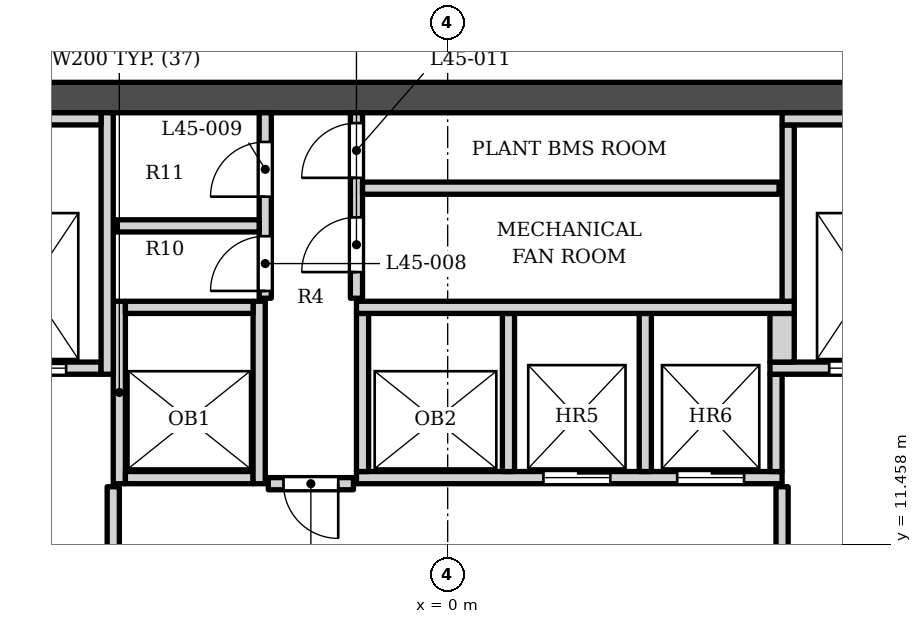
"""IFC4 building model, lengths in metres.
Left out: names, types, materials, properties, quantities, classifications, styles, units other than length and angle.
Written with IfcOpenShell. Run it as: python <this file> out.ifc"""

import sys

from ifc_helpers import new_model, si_unit, direction, frame, frame_2d, origin, place, context, subcontext, project, spatial, rectangle, extrude, element, fill, save


model = new_model("IFC4")
c1 = context("Model", 3, precision=1e-05, world=origin(), true_north=direction((0.0, 1.0)))
c2 = subcontext(c1, "Body", "Model", "MODEL_VIEW")
j1 = project(units=[si_unit("LENGTHUNIT", "METRE"), si_unit("PLANEANGLEUNIT", "RADIAN")], contexts=[c1])
p1 = place(None, origin())
s1 = spatial("IfcSite", under=j1, at=p1, CompositionType="ELEMENT")
p2 = place(p1, origin())
s2 = spatial("IfcBuilding", under=s1, at=p2, CompositionType="ELEMENT")
p3 = place(p2, frame((0.0, 0.0, 191.4)))
s3 = spatial("IfcBuildingStorey", under=s2, at=p3, CompositionType="ELEMENT", Elevation=191.4)
p4 = place(p3, frame((-15.1, 18.802, 0.0), z_axis=(0.0, 0.0, 1.0), x_axis=(1.0, 0.0, 0.0)))
e1 = element("IfcWall", 1, at=p4, inside=s3, PredefinedType="SHEAR", context=c2, shape_type="SweptSolid", body=[
    extrude(rectangle(XDim=30.2, YDim=0.5, at=frame_2d((15.1, 0.0))), origin(), (0.0, 0.0, 1.0), 5.0),
])
p5 = place(p3, frame((-5.5, 9.103, 0.0), z_axis=(0.0, 0.0, 1.0), x_axis=(0.0, 1.0, 0.0)))
e2 = element("IfcWall", 2, at=p5, inside=s3, PredefinedType="SOLIDWALL", context=c2, shape_type="SweptSolid", body=[
    extrude(rectangle(XDim=3.3, YDim=0.2, at=frame_2d((1.65, 0.0))), origin(), (0.0, 0.0, 1.0), 4.83),
])
p6 = place(p5, frame((0.85, 0.0, 0.0)))
e3 = element("IfcOpeningElement", 3, at=p6, cuts=e2, PredefinedType="OPENING", context=c2, shape_type="SweptSolid", body=[
    extrude(rectangle(XDim=1.4, YDim=2.1, at=frame_2d((0.7, 1.05))), frame((0.0, 0.11, 0.0), z_axis=(0.0, -1.0, 0.0), x_axis=(1.0, 0.0, 0.0)), (0.0, 0.0, 1.0), 0.22),
])
p7 = place(p3, frame((5.5, 9.103, 0.0), z_axis=(0.0, 0.0, 1.0), x_axis=(0.0, 1.0, 0.0)))
e4 = element("IfcWall", 4, at=p7, inside=s3, PredefinedType="SOLIDWALL", context=c2, shape_type="SweptSolid", body=[
    extrude(rectangle(XDim=3.3, YDim=0.2, at=frame_2d((1.65, 0.0))), origin(), (0.0, 0.0, 1.0), 4.83),
])
p8 = place(p7, frame((0.85, 0.0, 0.0)))
e5 = element("IfcOpeningElement", 5, at=p8, cuts=e4, PredefinedType="OPENING", context=c2, shape_type="SweptSolid", body=[
    extrude(rectangle(XDim=1.4, YDim=2.1, at=frame_2d((0.7, 1.05))), frame((0.0, 0.11, 0.0), z_axis=(0.0, -1.0, 0.0), x_axis=(1.0, 0.0, 0.0)), (0.0, 0.0, 1.0), 0.22),
])
p9 = place(p3, frame((-2.95, 12.453, 0.0), z_axis=(0.0, 0.0, 1.0), x_axis=(1.0, 0.0, 0.0)))
e6 = element("IfcWall", 6, at=p9, inside=s3, PredefinedType="SOLIDWALL", context=c2, shape_type="SweptSolid", body=[
    extrude(rectangle(XDim=1.4, YDim=0.2, at=frame_2d((0.7, 0.0))), origin(), (0.0, 0.0, 1.0), 4.83),
])
p10 = place(p9, frame((0.25, 0.0, 0.0)))
e7 = element("IfcOpeningElement", 7, at=p10, cuts=e6, PredefinedType="OPENING", context=c2, shape_type="SweptSolid", body=[
    extrude(rectangle(XDim=0.9, YDim=2.1, at=frame_2d((0.45, 1.05))), frame((0.0, 0.11, 0.0), z_axis=(0.0, -1.0, 0.0), x_axis=(1.0, 0.0, 0.0)), (0.0, 0.0, 1.0), 0.22),
])
p11 = place(p3, frame((-5.4, 12.453, 0.0), z_axis=(0.0, 0.0, 1.0), x_axis=(0.0, 1.0, 0.0)))
e8 = element("IfcWall", 8, at=p11, inside=s3, PredefinedType="SOLIDWALL", context=c2, shape_type="SweptSolid", body=[
    extrude(rectangle(XDim=3.0, YDim=0.2, at=frame_2d((1.5, 0.0))), origin(), (0.0, 0.0, 1.0), 4.83),
])
p12 = place(p3, frame((-5.3, 12.552, 0.0), z_axis=(0.0, 0.0, 1.0), x_axis=(1.0, 0.0, 0.0)))
e9 = element("IfcWall", 9, at=p12, inside=s3, PredefinedType="SOLIDWALL", context=c2, shape_type="SweptSolid", body=[
    extrude(rectangle(XDim=2.1, YDim=0.2, at=frame_2d((1.05, 0.0))), origin(), (0.0, 0.0, 1.0), 4.83),
])
p13 = place(p3, frame((-3.1, 12.453, 0.0), z_axis=(0.0, 0.0, 1.0), x_axis=(0.0, 1.0, 0.0)))
e10 = element("IfcWall", 10, at=p13, inside=s3, PredefinedType="SOLIDWALL", context=c2, shape_type="SweptSolid", body=[
    extrude(rectangle(XDim=3.0, YDim=0.2, at=frame_2d((1.5, 0.0))), origin(), (0.0, 0.0, 1.0), 4.83),
])
p14 = place(p3, frame((-1.5, 12.552, 0.0), z_axis=(0.0, 0.0, 1.0), x_axis=(1.0, 0.0, 0.0)))
e11 = element("IfcWall", 11, at=p14, inside=s3, PredefinedType="SOLIDWALL", context=c2, shape_type="SweptSolid", body=[
    extrude(rectangle(XDim=7.0, YDim=0.2, at=frame_2d((3.5, 0.0))), origin(), (0.0, 0.0, 1.0), 4.83),
])
p15 = place(p14, frame((3.075, 0.0, 0.0)))
e12 = element("IfcOpeningElement", 12, at=p15, cuts=e11, PredefinedType="OPENING", context=c2, shape_type="SweptSolid", body=[
    extrude(rectangle(XDim=1.1, YDim=2.1, at=frame_2d((0.55, 1.05))), frame((0.0, 0.11, 0.0), z_axis=(0.0, -1.0, 0.0), x_axis=(1.0, 0.0, 0.0)), (0.0, 0.0, 1.0), 0.22),
])
p16 = place(p14, frame((5.275, 0.0, 0.0)))
e13 = element("IfcOpeningElement", 13, at=p16, cuts=e11, PredefinedType="OPENING", context=c2, shape_type="SweptSolid", body=[
    extrude(rectangle(XDim=1.1, YDim=2.1, at=frame_2d((0.55, 1.05))), frame((0.0, 0.11, 0.0), z_axis=(0.0, -1.0, 0.0), x_axis=(1.0, 0.0, 0.0)), (0.0, 0.0, 1.0), 0.22),
])
for number, where, z_axis, x_axis in (
    (14, (-1.4, 12.653, 0.0), (0.0, 0.0, 1.0), (0.0, 1.0, 0.0)),
    (15, (1.0, 12.653, 0.0), (0.0, 0.0, 1.0), (0.0, 1.0, 0.0)),
    (16, (3.25, 12.653, 0.0), (0.0, 0.0, 1.0), (0.0, 1.0, 0.0)),
):
    element("IfcWall", number, at=place(p3, frame(where, z_axis=z_axis, x_axis=x_axis)), inside=s3, PredefinedType="SOLIDWALL", context=c2, shape_type="SweptSolid", body=[
        extrude(rectangle(XDim=2.6, YDim=0.2, at=frame_2d((1.3, 0.0))), origin(), (0.0, 0.0, 1.0), 4.83),
    ])
p17 = place(p3, frame((5.4, 12.653, 0.0), z_axis=(0.0, 0.0, 1.0), x_axis=(0.0, 1.0, 0.0)))
e17 = element("IfcWall", 17, at=p17, inside=s3, PredefinedType="SOLIDWALL", context=c2, shape_type="SweptSolid", body=[
    extrude(rectangle(XDim=1.6, YDim=0.2, at=frame_2d((0.8, 0.0))), origin(), (0.0, 0.0, 1.0), 4.83),
])
p18 = place(p3, frame((-8.05, 14.353, 0.0), z_axis=(0.0, 0.0, 1.0), x_axis=(1.0, 0.0, 0.0)))
e18 = element("IfcWall", 18, at=p18, inside=s3, PredefinedType="SOLIDWALL", context=c2, shape_type="SweptSolid", body=[
    extrude(rectangle(XDim=2.35, YDim=0.2, at=frame_2d((1.175, 0.0))), origin(), (0.0, 0.0, 1.0), 4.83),
])
p19 = place(p18, frame((0.575, 0.0, 0.0)))
e19 = element("IfcOpeningElement", 19, at=p19, cuts=e18, PredefinedType="OPENING", context=c2, shape_type="SweptSolid", body=[
    extrude(rectangle(XDim=1.2, YDim=2.1, at=frame_2d((0.6, 1.05))), frame((0.0, 0.11, 0.0), z_axis=(0.0, -1.0, 0.0), x_axis=(1.0, 0.0, 0.0)), (0.0, 0.0, 1.0), 0.22),
])
p20 = place(p3, frame((-5.6, 14.253, 0.0), z_axis=(0.0, 0.0, 1.0), x_axis=(0.0, 1.0, 0.0)))
e20 = element("IfcWall", 20, at=p20, inside=s3, PredefinedType="SOLIDWALL", context=c2, shape_type="SweptSolid", body=[
    extrude(rectangle(XDim=4.3, YDim=0.2, at=frame_2d((2.15, 0.0))), origin(), (0.0, 0.0, 1.0), 4.83),
])
p21 = place(p3, frame((5.3, 14.353, 0.0), z_axis=(0.0, 0.0, 1.0), x_axis=(1.0, 0.0, 0.0)))
e21 = element("IfcWall", 21, at=p21, inside=s3, PredefinedType="SOLIDWALL", context=c2, shape_type="SweptSolid", body=[
    extrude(rectangle(XDim=2.75, YDim=0.2, at=frame_2d((1.375, 0.0))), origin(), (0.0, 0.0, 1.0), 4.83),
])
p22 = place(p21, frame((0.975, 0.0, 0.0)))
e22 = element("IfcOpeningElement", 22, at=p22, cuts=e21, PredefinedType="OPENING", context=c2, shape_type="SweptSolid", body=[
    extrude(rectangle(XDim=1.2, YDim=2.1, at=frame_2d((0.6, 1.05))), frame((0.0, 0.11, 0.0), z_axis=(0.0, -1.0, 0.0), x_axis=(1.0, 0.0, 0.0)), (0.0, 0.0, 1.0), 0.22),
])
p23 = place(p3, frame((5.5, 14.453, 0.0), z_axis=(0.0, 0.0, 1.0), x_axis=(0.0, 1.0, 0.0)))
e23 = element("IfcWall", 23, at=p23, inside=s3, PredefinedType="SOLIDWALL", context=c2, shape_type="SweptSolid", body=[
    extrude(rectangle(XDim=0.8, YDim=0.4, at=frame_2d((0.4, 0.0))), origin(), (0.0, 0.0, 1.0), 4.83),
])
p24 = place(p3, frame((-5.3, 15.353, 0.0), z_axis=(0.0, 0.0, 1.0), x_axis=(1.0, 0.0, 0.0)))
e24 = element("IfcWall", 24, at=p24, inside=s3, PredefinedType="SOLIDWALL", context=c2, shape_type="SweptSolid", body=[
    extrude(rectangle(XDim=2.1, YDim=0.2, at=frame_2d((1.05, 0.0))), origin(), (0.0, 0.0, 1.0), 4.83),
])
p25 = place(p3, frame((-1.5, 15.353, 0.0), z_axis=(0.0, 0.0, 1.0), x_axis=(1.0, 0.0, 0.0)))
e25 = element("IfcWall", 25, at=p25, inside=s3, PredefinedType="SOLIDWALL", context=c2, shape_type="SweptSolid", body=[
    extrude(rectangle(XDim=7.2, YDim=0.2, at=frame_2d((3.6, 0.0))), origin(), (0.0, 0.0, 1.0), 4.83),
])
p26 = place(p3, frame((5.6, 15.453, 0.0), z_axis=(0.0, 0.0, 1.0), x_axis=(0.0, 1.0, 0.0)))
e26 = element("IfcWall", 26, at=p26, inside=s3, PredefinedType="SOLIDWALL", context=c2, shape_type="SweptSolid", body=[
    extrude(rectangle(XDim=2.9, YDim=0.2, at=frame_2d((1.45, 0.0))), origin(), (0.0, 0.0, 1.0), 4.83),
])
p27 = place(p3, frame((-3.0, 15.503, 0.0), z_axis=(0.0, 0.0, 1.0), x_axis=(0.0, 1.0, 0.0)))
e27 = element("IfcWall", 27, at=p27, inside=s3, PredefinedType="SOLIDWALL", context=c2, shape_type="SweptSolid", body=[
    extrude(rectangle(XDim=3.05, YDim=0.2, at=frame_2d((1.525, 0.0))), origin(), (0.0, 0.0, 1.0), 4.83),
])
p28 = place(p27, frame((0.12, 0.0, 0.0)))
e28 = element("IfcOpeningElement", 28, at=p28, cuts=e27, PredefinedType="OPENING", context=c2, shape_type="SweptSolid", body=[
    extrude(rectangle(XDim=0.9, YDim=2.1, at=frame_2d((0.45, 1.05))), frame((0.0, 0.11, 0.0), z_axis=(0.0, -1.0, 0.0), x_axis=(1.0, 0.0, 0.0)), (0.0, 0.0, 1.0), 0.22),
])
p29 = place(p27, frame((1.67, 0.0, 0.0)))
e29 = element("IfcOpeningElement", 29, at=p29, cuts=e27, PredefinedType="OPENING", context=c2, shape_type="SweptSolid", body=[
    extrude(rectangle(XDim=0.9, YDim=2.1, at=frame_2d((0.45, 1.05))), frame((0.0, 0.11, 0.0), z_axis=(0.0, -1.0, 0.0), x_axis=(1.0, 0.0, 0.0)), (0.0, 0.0, 1.0), 0.22),
])
p30 = place(p3, frame((-1.5, 15.503, 0.0), z_axis=(0.0, 0.0, 1.0), x_axis=(0.0, 1.0, 0.0)))
e30 = element("IfcWall", 30, at=p30, inside=s3, PredefinedType="SOLIDWALL", context=c2, shape_type="SweptSolid", body=[
    extrude(rectangle(XDim=3.05, YDim=0.2, at=frame_2d((1.525, 0.0))), origin(), (0.0, 0.0, 1.0), 4.83),
])
p31 = place(p30, frame((0.43, 0.0, 0.0)))
e31 = element("IfcOpeningElement", 31, at=p31, cuts=e30, PredefinedType="OPENING", context=c2, shape_type="SweptSolid", body=[
    extrude(rectangle(XDim=0.9, YDim=2.1, at=frame_2d((0.45, 1.05))), frame((0.0, 0.11, 0.0), z_axis=(0.0, -1.0, 0.0), x_axis=(1.0, 0.0, 0.0)), (0.0, 0.0, 1.0), 0.22),
])
p32 = place(p30, frame((1.98, 0.0, 0.0)))
e32 = element("IfcOpeningElement", 32, at=p32, cuts=e30, PredefinedType="OPENING", context=c2, shape_type="SweptSolid", body=[
    extrude(rectangle(XDim=0.9, YDim=2.1, at=frame_2d((0.45, 1.05))), frame((0.0, 0.11, 0.0), z_axis=(0.0, -1.0, 0.0), x_axis=(1.0, 0.0, 0.0)), (0.0, 0.0, 1.0), 0.22),
])
p33 = place(p3, frame((-5.45, 16.693, 0.0), z_axis=(0.0, 0.0, 1.0), x_axis=(1.0, 0.0, 0.0)))
e33 = element("IfcWall", 33, at=p33, inside=s3, PredefinedType="SOLIDWALL", context=c2, shape_type="SweptSolid", body=[
    extrude(rectangle(XDim=2.35, YDim=0.2, at=frame_2d((1.175, 0.0))), origin(), (0.0, 0.0, 1.0), 4.83),
])
p34 = place(p3, frame((-1.4, 17.312, 0.0), z_axis=(0.0, 0.0, 1.0), x_axis=(1.0, 0.0, 0.0)))
e34 = element("IfcWall", 34, at=p34, inside=s3, PredefinedType="SOLIDWALL", context=c2, shape_type="SweptSolid", body=[
    extrude(rectangle(XDim=6.85, YDim=0.2, at=frame_2d((3.425, 0.0))), origin(), (0.0, 0.0, 1.0), 4.83),
])
p35 = place(p3, frame((-8.05, 18.453, 0.0), z_axis=(0.0, 0.0, 1.0), x_axis=(1.0, 0.0, 0.0)))
e35 = element("IfcWall", 35, at=p35, inside=s3, PredefinedType="SOLIDWALL", context=c2, shape_type="SweptSolid", body=[
    extrude(rectangle(XDim=2.35, YDim=0.2, at=frame_2d((1.175, 0.0))), origin(), (0.0, 0.0, 1.0), 4.83),
])
p36 = place(p3, frame((5.5, 18.453, 0.0), z_axis=(0.0, 0.0, 1.0), x_axis=(1.0, 0.0, 0.0)))
e36 = element("IfcWall", 36, at=p36, inside=s3, PredefinedType="SOLIDWALL", context=c2, shape_type="SweptSolid", body=[
    extrude(rectangle(XDim=2.55, YDim=0.2, at=frame_2d((1.275, 0.0))), origin(), (0.0, 0.0, 1.0), 4.83),
])
p37 = place(p15, origin())
e37 = element("IfcDoor", 37, at=p37, inside=s3, OperationType="DOUBLE_DOOR_SLIDING", PredefinedType="DOOR", context=c2, shape_type="SweptSolid", body=[
    extrude(rectangle(XDim=1.1, YDim=2.1, at=frame_2d((0.55, 1.05))), frame((0.0, 0.025, 0.0), z_axis=(0.0, -1.0, 0.0), x_axis=(1.0, 0.0, 0.0)), (0.0, 0.0, 1.0), 0.05),
])
fill(e12, e37)
p38 = place(p16, origin())
e38 = element("IfcDoor", 38, at=p38, inside=s3, OperationType="DOUBLE_DOOR_SLIDING", PredefinedType="DOOR", context=c2, shape_type="SweptSolid", body=[
    extrude(rectangle(XDim=1.1, YDim=2.1, at=frame_2d((0.55, 1.05))), frame((0.0, 0.025, 0.0), z_axis=(0.0, -1.0, 0.0), x_axis=(1.0, 0.0, 0.0)), (0.0, 0.0, 1.0), 0.05),
])
fill(e13, e38)
p39 = place(p19, origin())
e39 = element("IfcDoor", 39, at=p39, inside=s3, OperationType="DOUBLE_DOOR_SLIDING", PredefinedType="DOOR", context=c2, shape_type="SweptSolid", body=[
    extrude(rectangle(XDim=1.2, YDim=2.1, at=frame_2d((0.6, 1.05))), frame((0.0, 0.025, 0.0), z_axis=(0.0, -1.0, 0.0), x_axis=(1.0, 0.0, 0.0)), (0.0, 0.0, 1.0), 0.05),
])
fill(e19, e39)
p40 = place(p22, origin())
e40 = element("IfcDoor", 40, at=p40, inside=s3, OperationType="DOUBLE_DOOR_SLIDING", PredefinedType="DOOR", context=c2, shape_type="SweptSolid", body=[
    extrude(rectangle(XDim=1.2, YDim=2.1, at=frame_2d((0.6, 1.05))), frame((0.0, 0.025, 0.0), z_axis=(0.0, -1.0, 0.0), x_axis=(1.0, 0.0, 0.0)), (0.0, 0.0, 1.0), 0.05),
])
fill(e22, e40)
p41 = place(p10, origin())
e41 = element("IfcDoor", 41, at=p41, inside=s3, OperationType="SINGLE_SWING_RIGHT", PredefinedType="DOOR", context=c2, shape_type="SweptSolid", body=[
    extrude(rectangle(XDim=0.9, YDim=2.1, at=frame_2d((0.45, 1.05))), frame((0.0, 0.025, 0.0), z_axis=(0.0, -1.0, 0.0), x_axis=(1.0, 0.0, 0.0)), (0.0, 0.0, 1.0), 0.05),
])
fill(e7, e41)
p42 = place(p28, origin())
e42 = element("IfcDoor", 42, at=p42, inside=s3, OperationType="SINGLE_SWING_LEFT", PredefinedType="DOOR", context=c2, shape_type="SweptSolid", body=[
    extrude(rectangle(XDim=0.9, YDim=2.1, at=frame_2d((0.45, 1.05))), frame((0.0, 0.025, 0.0), z_axis=(0.0, -1.0, 0.0), x_axis=(1.0, 0.0, 0.0)), (0.0, 0.0, 1.0), 0.05),
])
fill(e28, e42)
p43 = place(p29, origin())
e43 = element("IfcDoor", 43, at=p43, inside=s3, OperationType="SINGLE_SWING_LEFT", PredefinedType="DOOR", context=c2, shape_type="SweptSolid", body=[
    extrude(rectangle(XDim=0.9, YDim=2.1, at=frame_2d((0.45, 1.05))), frame((0.0, 0.025, 0.0), z_axis=(0.0, -1.0, 0.0), x_axis=(1.0, 0.0, 0.0)), (0.0, 0.0, 1.0), 0.05),
])
fill(e29, e43)
p44 = place(p31, origin())
e44 = element("IfcDoor", 44, at=p44, inside=s3, OperationType="SINGLE_SWING_LEFT", PredefinedType="DOOR", context=c2, shape_type="SweptSolid", body=[
    extrude(rectangle(XDim=0.9, YDim=2.1, at=frame_2d((0.45, 1.05))), frame((0.0, 0.025, 0.0), z_axis=(0.0, -1.0, 0.0), x_axis=(1.0, 0.0, 0.0)), (0.0, 0.0, 1.0), 0.05),
])
fill(e31, e44)
p45 = place(p32, origin())
e45 = element("IfcDoor", 45, at=p45, inside=s3, OperationType="SINGLE_SWING_LEFT", PredefinedType="DOOR", context=c2, shape_type="SweptSolid", body=[
    extrude(rectangle(XDim=0.9, YDim=2.1, at=frame_2d((0.45, 1.05))), frame((0.0, 0.025, 0.0), z_axis=(0.0, -1.0, 0.0), x_axis=(1.0, 0.0, 0.0)), (0.0, 0.0, 1.0), 0.05),
])
fill(e32, e45)
save(model, sys.argv[1])
